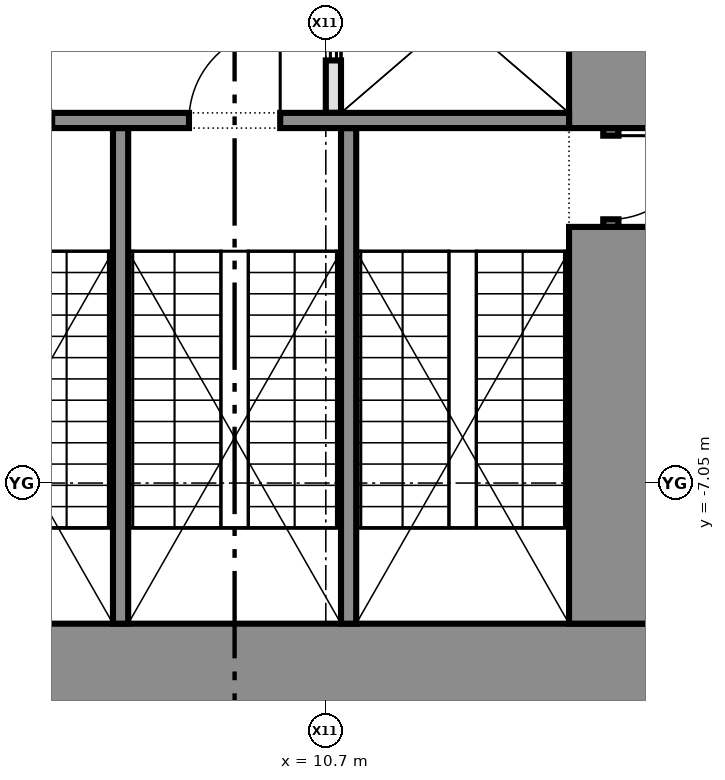
"""IFC4 building model, lengths in metres.
Left out: names, types, materials, properties, quantities, classifications, styles, units other than length and angle.
Written with IfcOpenShell. Run it as: python <this file> out.ifc"""

import sys

from ifc_helpers import new_model, si_unit, direction, frame, frame_2d, origin, place, context, subcontext, project, spatial, rectangle, extrude, element, fill, save


model = new_model("IFC4")
c1 = context("Model", 3, precision=1e-05, world=origin(), true_north=direction((0.0, 1.0)))
c2 = subcontext(c1, "Body", "Model", "MODEL_VIEW")
j1 = project(units=[si_unit("LENGTHUNIT", "METRE"), si_unit("PLANEANGLEUNIT", "RADIAN")], contexts=[c1])
p1 = place(None, origin())
s1 = spatial("IfcSite", under=j1, at=p1, CompositionType="ELEMENT")
p2 = place(p1, origin())
s2 = spatial("IfcBuilding", under=s1, at=p2, CompositionType="ELEMENT")
p3 = place(p2, frame((0.0, 0.0, 49.7)))
s3 = spatial("IfcBuildingStorey", under=s2, at=p3, CompositionType="ELEMENT", Elevation=49.7)
p4 = place(p3, frame((15.0, -9.45, 0.0), z_axis=(0.0, 0.0, 1.0), x_axis=(-1.0, 0.0, 0.0)))
e1 = element("IfcWall", 1, at=p4, inside=s3, PredefinedType="SHEAR", context=c2, shape_type="SweptSolid", body=[
    extrude(rectangle(XDim=11.0, YDim=1.1, at=frame_2d((5.5, 0.0))), origin(), (0.0, 0.0, 1.0), 4.575),
])
p5 = place(p3, frame((14.45, 3.75, 0.0), z_axis=(0.0, 0.0, 1.0), x_axis=(0.0, -1.0, 0.0)))
e2 = element("IfcWall", 2, at=p5, inside=s3, PredefinedType="SHEAR", context=c2, shape_type="SweptSolid", body=[
    extrude(rectangle(XDim=6.13, YDim=1.1, at=frame_2d((3.065, 0.0))), origin(), (0.0, 0.0, 1.0), 4.575),
])
p6 = place(p3, frame((14.45, -2.38, 0.0), z_axis=(0.0, 0.0, 1.0), x_axis=(0.0, -1.0, 0.0)))
e3 = element("IfcWall", 3, at=p6, inside=s3, PredefinedType="SHEAR", context=c2, shape_type="SweptSolid", body=[
    extrude(rectangle(XDim=1.3, YDim=0.2, at=frame_2d((0.65, 0.0))), origin(), (0.0, 0.0, 1.0), 2.4),
])
p7 = place(p6, frame((0.1, 0.0, 0.0)))
e4 = element("IfcOpeningElement", 4, at=p7, cuts=e3, PredefinedType="OPENING", context=c2, shape_type="SweptSolid", body=[
    extrude(rectangle(XDim=1.1, YDim=2.1, at=frame_2d((0.55, 1.05))), frame((0.0, 0.11, 0.0), z_axis=(0.0, -1.0, 0.0), x_axis=(1.0, 0.0, 0.0)), (0.0, 0.0, 1.0), 0.22),
])
p8 = place(p3, frame((14.45, -3.68, 0.0), z_axis=(0.0, 0.0, 1.0), x_axis=(0.0, -1.0, 0.0)))
e5 = element("IfcWall", 5, at=p8, inside=s3, PredefinedType="SHEAR", context=c2, shape_type="SweptSolid", body=[
    extrude(rectangle(XDim=5.22, YDim=1.1, at=frame_2d((2.61, 0.0))), origin(), (0.0, 0.0, 1.0), 4.575),
])
p9 = place(p3, frame((10.8, 0.4, 0.0), z_axis=(0.0, 0.0, 1.0), x_axis=(0.0, -1.0, 0.0)))
e6 = element("IfcWall", 6, at=p9, inside=s3, PredefinedType="PARTITIONING", context=c2, shape_type="SweptSolid", body=[
    extrude(rectangle(XDim=2.58, YDim=0.2, at=frame_2d((1.29, 0.0))), origin(), (0.0, 0.0, 1.0), 4.575),
])
p10 = place(p9, frame((0.69, 0.0, 0.0)))
e7 = element("IfcOpeningElement", 7, at=p10, cuts=e6, PredefinedType="OPENING", context=c2, shape_type="SweptSolid", body=[
    extrude(rectangle(XDim=1.2, YDim=2.1, at=frame_2d((0.6, 1.05))), frame((0.0, 0.11, 0.0), z_axis=(0.0, -1.0, 0.0), x_axis=(1.0, 0.0, 0.0)), (0.0, 0.0, 1.0), 0.22),
])
p11 = place(p3, frame((13.9, -2.28, 0.0), z_axis=(0.0, 0.0, 1.0), x_axis=(-1.0, 0.0, 0.0)))
e8 = element("IfcWall", 8, at=p11, inside=s3, PredefinedType="SHEAR", context=c2, shape_type="SweptSolid", body=[
    extrude(rectangle(XDim=8.8, YDim=0.2, at=frame_2d((4.4, 0.0))), origin(), (0.0, 0.0, 1.0), 4.575),
])
p12 = place(p11, frame((3.8, 0.0, 0.0)))
e9 = element("IfcOpeningElement", 9, at=p12, cuts=e8, PredefinedType="OPENING", context=c2, shape_type="SweptSolid", body=[
    extrude(rectangle(XDim=1.2, YDim=2.1, at=frame_2d((0.6, 1.05))), frame((0.0, 0.11, 0.0), z_axis=(0.0, -1.0, 0.0), x_axis=(1.0, 0.0, 0.0)), (0.0, 0.0, 1.0), 0.22),
])
p13 = place(p11, frame((6.8, 0.0, 0.0)))
e10 = element("IfcOpeningElement", 10, at=p13, cuts=e8, PredefinedType="OPENING", context=c2, shape_type="SweptSolid", body=[
    extrude(rectangle(XDim=1.2, YDim=2.1, at=frame_2d((0.6, 1.05))), frame((0.0, 0.11, 0.0), z_axis=(0.0, -1.0, 0.0), x_axis=(1.0, 0.0, 0.0)), (0.0, 0.0, 1.0), 0.22),
])
for number, where, z_axis, x_axis in (
    (11, (11.0, -2.38, 0.0), (0.0, 0.0, 1.0), (0.0, -1.0, 0.0)),
    (12, (8.0, -2.38, 0.0), (0.0, 0.0, 1.0), (0.0, -1.0, 0.0)),
):
    element("IfcWall", number, at=place(p3, frame(where, z_axis=z_axis, x_axis=x_axis)), inside=s3, PredefinedType="SHEAR", context=c2, shape_type="SweptSolid", body=[
        extrude(rectangle(XDim=6.52, YDim=0.2, at=frame_2d((3.26, 0.0))), origin(), (0.0, 0.0, 1.0), 4.575),
    ])
p14 = place(p7, origin())
e13 = element("IfcDoor", 13, at=p14, inside=s3, OperationType="SINGLE_SWING_LEFT", PredefinedType="DOOR", context=c2, shape_type="SweptSolid", body=[
    extrude(rectangle(XDim=1.1, YDim=2.1, at=frame_2d((0.55, 1.05))), frame((0.0, 0.025, 0.0), z_axis=(0.0, -1.0, 0.0), x_axis=(1.0, 0.0, 0.0)), (0.0, 0.0, 1.0), 0.05),
])
fill(e4, e13)
p15 = place(p10, origin())
e14 = element("IfcDoor", 14, at=p15, inside=s3, OperationType="DOUBLE_DOOR_SLIDING", PredefinedType="DOOR", context=c2, shape_type="SweptSolid", body=[
    extrude(rectangle(XDim=1.2, YDim=2.1, at=frame_2d((0.6, 1.05))), frame((0.0, 0.025, 0.0), z_axis=(0.0, -1.0, 0.0), x_axis=(1.0, 0.0, 0.0)), (0.0, 0.0, 1.0), 0.05),
])
fill(e7, e14)
p16 = place(p12, frame((1.2, 0.0, 0.0), z_axis=(0.0, 0.0, 1.0), x_axis=(-1.0, 0.0, 0.0)))
e15 = element("IfcDoor", 15, at=p16, inside=s3, OperationType="SINGLE_SWING_RIGHT", PredefinedType="DOOR", context=c2, shape_type="SweptSolid", body=[
    extrude(rectangle(XDim=1.2, YDim=2.1, at=frame_2d((0.6, 1.05))), frame((0.0, 0.025, 0.0), z_axis=(0.0, -1.0, 0.0), x_axis=(1.0, 0.0, 0.0)), (0.0, 0.0, 1.0), 0.05),
])
fill(e9, e15)
save(model, sys.argv[1])
